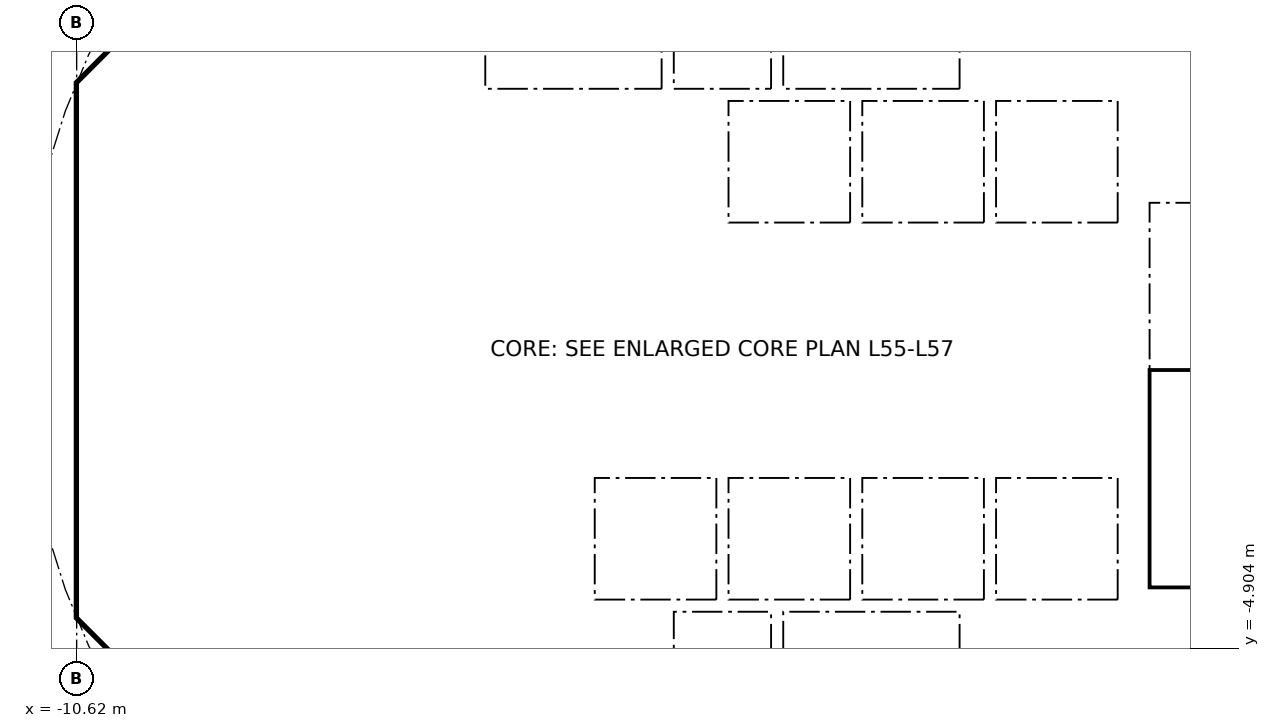
"""IFC4 building model, lengths in metres.
Left out: names, types, materials, properties, quantities, classifications, styles, units other than length and angle.
Written with IfcOpenShell. Run it as: python <this file> out.ifc"""

import sys

from ifc_helpers import new_model, si_unit, direction, frame, frame_2d, origin, place, context, subcontext, project, spatial, polyline, rectangle, outline, extrude, element, fill, save


model = new_model("IFC4")
c1 = context("Model", 3, precision=1e-05, world=origin(), true_north=direction((0.0, 1.0)))
c2 = subcontext(c1, "Body", "Model", "MODEL_VIEW")
j1 = project(units=[si_unit("LENGTHUNIT", "METRE"), si_unit("PLANEANGLEUNIT", "RADIAN")], contexts=[c1])
p1 = place(None, origin())
s1 = spatial("IfcSite", under=j1, at=p1, CompositionType="ELEMENT")
p2 = place(p1, origin())
s2 = spatial("IfcBuilding", under=s1, at=p2, CompositionType="ELEMENT")
p3 = place(p2, frame((0.0, 0.0, 219.6)))
s3 = spatial("IfcBuildingStorey", under=s2, at=p3, CompositionType="ELEMENT", Elevation=219.6)
p4 = place(p3, frame((9.988, 4.613, 0.0), z_axis=(0.0, 0.0, 1.0), x_axis=(-0.707106781187, 0.707106781187, 0.0)))
e1 = element("IfcWall", 1, at=p4, inside=s3, PredefinedType="SHEAR", context=c2, shape_type="SweptSolid", body=[
    extrude(rectangle(XDim=7.602, YDim=0.6, at=frame_2d((3.801, 0.0))), origin(), (0.0, 0.0, 1.0), 3.44),
])
p5 = place(p4, frame((3.201, 0.0, 0.0)))
e2 = element("IfcOpeningElement", 2, at=p5, cuts=e1, PredefinedType="OPENING", context=c2, shape_type="SweptSolid", body=[
    extrude(rectangle(XDim=1.2, YDim=2.1, at=frame_2d((0.6, 1.05))), frame((0.0, 0.31, 0.0), z_axis=(0.0, -1.0, 0.0), x_axis=(1.0, 0.0, 0.0)), (0.0, 0.0, 1.0), 0.62),
])
p6 = place(p3, frame((-4.613, 9.988, 0.0), z_axis=(0.0, 0.0, 1.0), x_axis=(-0.707106781187, -0.707106781187, 0.0)))
e3 = element("IfcWall", 3, at=p6, inside=s3, PredefinedType="SHEAR", context=c2, shape_type="SweptSolid", body=[
    extrude(rectangle(XDim=7.602, YDim=0.6, at=frame_2d((3.801, 0.0))), origin(), (0.0, 0.0, 1.0), 3.44),
])
p7 = place(p6, frame((0.351, 0.0, 0.0)))
e4 = element("IfcOpeningElement", 4, at=p7, cuts=e3, PredefinedType="OPENING", context=c2, shape_type="SweptSolid", body=[
    extrude(rectangle(XDim=1.1, YDim=2.1, at=frame_2d((0.55, 1.05))), frame((0.0, 0.31, 0.0), z_axis=(0.0, -1.0, 0.0), x_axis=(1.0, 0.0, 0.0)), (0.0, 0.0, 1.0), 0.62),
])
p8 = place(p3, frame((-10.325, 3.801, 0.0), z_axis=(0.0, 0.0, 1.0), x_axis=(0.0, -1.0, 0.0)))
e5 = element("IfcWall", 5, at=p8, inside=s3, PredefinedType="SHEAR", context=c2, shape_type="SweptSolid", body=[
    extrude(rectangle(XDim=7.602, YDim=0.6, at=frame_2d((3.801, 0.0))), origin(), (0.0, 0.0, 1.0), 3.44),
])
p9 = place(p8, frame((0.651, 0.0, 0.0)))
e6 = element("IfcOpeningElement", 6, at=p9, cuts=e5, PredefinedType="OPENING", context=c2, shape_type="SweptSolid", body=[
    extrude(rectangle(XDim=1.5, YDim=2.1, at=frame_2d((0.75, 1.05))), frame((0.0, 0.31, 0.0), z_axis=(0.0, -1.0, 0.0), x_axis=(1.0, 0.0, 0.0)), (0.0, 0.0, 1.0), 0.62),
])
p10 = place(p8, frame((5.451, 0.0, 0.0)))
e7 = element("IfcOpeningElement", 7, at=p10, cuts=e5, PredefinedType="OPENING", context=c2, shape_type="SweptSolid", body=[
    extrude(rectangle(XDim=1.5, YDim=2.1, at=frame_2d((0.75, 1.05))), frame((0.0, 0.31, 0.0), z_axis=(0.0, -1.0, 0.0), x_axis=(1.0, 0.0, 0.0)), (0.0, 0.0, 1.0), 0.62),
])
p11 = place(p3, frame((-9.988, -4.613, 0.0), z_axis=(0.0, 0.0, 1.0), x_axis=(0.707106781187, -0.707106781187, 0.0)))
e8 = element("IfcWall", 8, at=p11, inside=s3, PredefinedType="SHEAR", context=c2, shape_type="SweptSolid", body=[
    extrude(rectangle(XDim=7.602, YDim=0.6, at=frame_2d((3.801, 0.0))), origin(), (0.0, 0.0, 1.0), 3.44),
])
p12 = place(p11, frame((6.151, 0.0, 0.0)))
e9 = element("IfcOpeningElement", 9, at=p12, cuts=e8, PredefinedType="OPENING", context=c2, shape_type="SweptSolid", body=[
    extrude(rectangle(XDim=1.1, YDim=2.1, at=frame_2d((0.55, 1.05))), frame((0.0, 0.31, 0.0), z_axis=(0.0, -1.0, 0.0), x_axis=(1.0, 0.0, 0.0)), (0.0, 0.0, 1.0), 0.62),
])
p13 = place(p3, frame((4.613, -9.988, 0.0), z_axis=(0.0, 0.0, 1.0), x_axis=(0.707106781187, 0.707106781187, 0.0)))
e10 = element("IfcWall", 10, at=p13, inside=s3, PredefinedType="SHEAR", context=c2, shape_type="SweptSolid", body=[
    extrude(rectangle(XDim=7.602, YDim=0.6, at=frame_2d((3.801, 0.0))), origin(), (0.0, 0.0, 1.0), 3.44),
])
p14 = place(p13, frame((3.201, 0.0, 0.0)))
e11 = element("IfcOpeningElement", 11, at=p14, cuts=e10, PredefinedType="OPENING", context=c2, shape_type="SweptSolid", body=[
    extrude(rectangle(XDim=1.2, YDim=2.1, at=frame_2d((0.6, 1.05))), frame((0.0, 0.31, 0.0), z_axis=(0.0, -1.0, 0.0), x_axis=(1.0, 0.0, 0.0)), (0.0, 0.0, 1.0), 0.62),
])
p15 = place(p3, frame((-6.2, 4.3, 0.0), z_axis=(0.0, 0.0, 1.0), x_axis=(0.0, 1.0, 0.0)))
e12 = element("IfcWall", 12, at=p15, inside=s3, PredefinedType="PARTITIONING", context=c2, shape_type="SweptSolid", body=[
    extrude(rectangle(XDim=3.527, YDim=0.15, at=frame_2d((1.763, 0.0))), origin(), (0.0, 0.0, 1.0), 3.44),
])
p16 = place(p15, frame((0.262, 0.0, 0.0)))
e13 = element("IfcOpeningElement", 13, at=p16, cuts=e12, PredefinedType="OPENING", context=c2, shape_type="SweptSolid", body=[
    extrude(rectangle(XDim=0.9, YDim=2.1, at=frame_2d((0.45, 1.05))), frame((0.0, 0.085, 0.0), z_axis=(0.0, -1.0, 0.0), x_axis=(1.0, 0.0, 0.0)), (0.0, 0.0, 1.0), 0.17),
])
p17 = place(p15, frame((2.138, 0.0, 0.0)))
e14 = element("IfcOpeningElement", 14, at=p17, cuts=e12, PredefinedType="OPENING", context=c2, shape_type="SweptSolid", body=[
    extrude(rectangle(XDim=0.9, YDim=2.1, at=frame_2d((0.45, 1.05))), frame((0.0, 0.085, 0.0), z_axis=(0.0, -1.0, 0.0), x_axis=(1.0, 0.0, 0.0)), (0.0, 0.0, 1.0), 0.17),
])
p18 = place(p3, frame((4.0, 4.3, 0.0), z_axis=(0.0, 0.0, 1.0), x_axis=(0.0, 1.0, 0.0)))
e15 = element("IfcWall", 15, at=p18, inside=s3, PredefinedType="SOLIDWALL", context=c2, shape_type="SweptSolid", body=[
    extrude(rectangle(XDim=2.2, YDim=0.2, at=frame_2d((1.1, 0.0))), origin(), (0.0, 0.0, 1.0), 3.44),
])
p19 = place(p18, frame((0.55, 0.0, 0.0)))
e16 = element("IfcOpeningElement", 16, at=p19, cuts=e15, PredefinedType="OPENING", context=c2, shape_type="SweptSolid", body=[
    extrude(rectangle(XDim=1.1, YDim=2.1, at=frame_2d((0.55, 1.05))), frame((0.0, 0.11, 0.0), z_axis=(0.0, -1.0, 0.0), x_axis=(1.0, 0.0, 0.0)), (0.0, 0.0, 1.0), 0.22),
])
p20 = place(p3, frame((-4.0, 4.3, 0.0), z_axis=(0.0, 0.0, 1.0), x_axis=(0.0, 1.0, 0.0)))
e17 = element("IfcWall", 17, at=p20, inside=s3, PredefinedType="SOLIDWALL", context=c2, shape_type="SweptSolid", body=[
    extrude(rectangle(XDim=2.2, YDim=0.2, at=frame_2d((1.1, 0.0))), origin(), (0.0, 0.0, 1.0), 3.44),
])
p21 = place(p20, frame((0.55, 0.0, 0.0)))
e18 = element("IfcOpeningElement", 18, at=p21, cuts=e17, PredefinedType="OPENING", context=c2, shape_type="SweptSolid", body=[
    extrude(rectangle(XDim=1.1, YDim=2.1, at=frame_2d((0.55, 1.05))), frame((0.0, 0.11, 0.0), z_axis=(0.0, -1.0, 0.0), x_axis=(1.0, 0.0, 0.0)), (0.0, 0.0, 1.0), 0.22),
])
p22 = place(p3, frame((-6.7, 2.0, 0.0), z_axis=(0.0, 0.0, 1.0), x_axis=(1.0, 0.0, 0.0)))
e19 = element("IfcWall", 19, at=p22, inside=s3, PredefinedType="SOLIDWALL", context=c2, shape_type="SweptSolid", body=[
    extrude(rectangle(XDim=13.4, YDim=0.2, at=frame_2d((6.7, 0.0))), origin(), (0.0, 0.0, 1.0), 3.44),
])
p23 = place(p22, frame((7.25, 0.0, 0.0)))
e20 = element("IfcOpeningElement", 20, at=p23, cuts=e19, PredefinedType="OPENING", context=c2, shape_type="SweptSolid", body=[
    extrude(rectangle(XDim=1.1, YDim=2.1, at=frame_2d((0.55, 1.05))), frame((0.0, 0.11, 0.0), z_axis=(0.0, -1.0, 0.0), x_axis=(1.0, 0.0, 0.0)), (0.0, 0.0, 1.0), 0.22),
])
p24 = place(p22, frame((9.45, 0.0, 0.0)))
e21 = element("IfcOpeningElement", 21, at=p24, cuts=e19, PredefinedType="OPENING", context=c2, shape_type="SweptSolid", body=[
    extrude(rectangle(XDim=1.1, YDim=2.1, at=frame_2d((0.55, 1.05))), frame((0.0, 0.11, 0.0), z_axis=(0.0, -1.0, 0.0), x_axis=(1.0, 0.0, 0.0)), (0.0, 0.0, 1.0), 0.22),
])
p25 = place(p22, frame((1.85, 0.0, 0.0)))
e22 = element("IfcOpeningElement", 22, at=p25, cuts=e19, PredefinedType="OPENING", context=c2, shape_type="SweptSolid", body=[
    extrude(rectangle(XDim=0.9, YDim=2.1, at=frame_2d((0.45, 1.05))), frame((0.0, 0.11, 0.0), z_axis=(0.0, -1.0, 0.0), x_axis=(1.0, 0.0, 0.0)), (0.0, 0.0, 1.0), 0.22),
])
p26 = place(p22, frame((5.15, 0.0, 0.0)))
e23 = element("IfcOpeningElement", 23, at=p26, cuts=e19, PredefinedType="OPENING", context=c2, shape_type="SweptSolid", body=[
    extrude(rectangle(XDim=0.9, YDim=2.1, at=frame_2d((0.45, 1.05))), frame((0.0, 0.11, 0.0), z_axis=(0.0, -1.0, 0.0), x_axis=(1.0, 0.0, 0.0)), (0.0, 0.0, 1.0), 0.22),
])
p27 = place(p3, frame((6.7, 4.0, 0.0), z_axis=(0.0, 0.0, 1.0), x_axis=(1.0, 0.0, 0.0)))
e24 = element("IfcWall", 24, at=p27, inside=s3, PredefinedType="SOLIDWALL", context=c2, shape_type="SweptSolid", body=[
    extrude(rectangle(XDim=3.325, YDim=0.2, at=frame_2d((1.662, 0.0))), origin(), (0.0, 0.0, 1.0), 3.44),
])
p28 = place(p27, frame((1.25, 0.0, 0.0)))
e25 = element("IfcOpeningElement", 25, at=p28, cuts=e24, PredefinedType="OPENING", context=c2, shape_type="SweptSolid", body=[
    extrude(rectangle(XDim=1.1, YDim=2.1, at=frame_2d((0.55, 1.05))), frame((0.0, 0.11, 0.0), z_axis=(0.0, -1.0, 0.0), x_axis=(1.0, 0.0, 0.0)), (0.0, 0.0, 1.0), 0.22),
])
p29 = place(p3, frame((-6.6, -7.427, 0.0), z_axis=(0.0, 0.0, 1.0), x_axis=(0.0, 1.0, 0.0)))
e26 = element("IfcWall", 26, at=p29, inside=s3, PredefinedType="PARTITIONING", context=c2, shape_type="SweptSolid", body=[
    extrude(rectangle(XDim=3.127, YDim=0.15, at=frame_2d((1.563, 0.0))), origin(), (0.0, 0.0, 1.0), 3.44),
])
p30 = place(p29, frame((1.076, 0.0, 0.0)))
e27 = element("IfcOpeningElement", 27, at=p30, cuts=e26, PredefinedType="OPENING", context=c2, shape_type="SweptSolid", body=[
    extrude(rectangle(XDim=0.9, YDim=2.1, at=frame_2d((0.45, 1.05))), frame((0.0, 0.085, 0.0), z_axis=(0.0, -1.0, 0.0), x_axis=(1.0, 0.0, 0.0)), (0.0, 0.0, 1.0), 0.17),
])
p31 = place(p3, frame((4.0, -6.5, 0.0), z_axis=(0.0, 0.0, 1.0), x_axis=(0.0, 1.0, 0.0)))
e28 = element("IfcWall", 28, at=p31, inside=s3, PredefinedType="SOLIDWALL", context=c2, shape_type="SweptSolid", body=[
    extrude(rectangle(XDim=2.2, YDim=0.2, at=frame_2d((1.1, 0.0))), origin(), (0.0, 0.0, 1.0), 3.44),
])
p32 = place(p31, frame((0.55, 0.0, 0.0)))
e29 = element("IfcOpeningElement", 29, at=p32, cuts=e28, PredefinedType="OPENING", context=c2, shape_type="SweptSolid", body=[
    extrude(rectangle(XDim=1.1, YDim=2.1, at=frame_2d((0.55, 1.05))), frame((0.0, 0.11, 0.0), z_axis=(0.0, -1.0, 0.0), x_axis=(1.0, 0.0, 0.0)), (0.0, 0.0, 1.0), 0.22),
])
p33 = place(p3, frame((-4.0, -6.5, 0.0), z_axis=(0.0, 0.0, 1.0), x_axis=(0.0, 1.0, 0.0)))
e30 = element("IfcWall", 30, at=p33, inside=s3, PredefinedType="SOLIDWALL", context=c2, shape_type="SweptSolid", body=[
    extrude(rectangle(XDim=2.2, YDim=0.2, at=frame_2d((1.1, 0.0))), origin(), (0.0, 0.0, 1.0), 3.44),
])
p34 = place(p33, frame((0.65, 0.0, 0.0)))
e31 = element("IfcOpeningElement", 31, at=p34, cuts=e30, PredefinedType="OPENING", context=c2, shape_type="SweptSolid", body=[
    extrude(rectangle(XDim=0.9, YDim=2.1, at=frame_2d((0.45, 1.05))), frame((0.0, 0.11, 0.0), z_axis=(0.0, -1.0, 0.0), x_axis=(1.0, 0.0, 0.0)), (0.0, 0.0, 1.0), 0.22),
])
p35 = place(p3, frame((-6.7, -2.0, 0.0), z_axis=(0.0, 0.0, 1.0), x_axis=(1.0, 0.0, 0.0)))
e32 = element("IfcWall", 32, at=p35, inside=s3, PredefinedType="SOLIDWALL", context=c2, shape_type="SweptSolid", body=[
    extrude(rectangle(XDim=13.4, YDim=0.2, at=frame_2d((6.7, 0.0))), origin(), (0.0, 0.0, 1.0), 3.44),
])
p36 = place(p35, frame((5.05, 0.0, 0.0)))
e33 = element("IfcOpeningElement", 33, at=p36, cuts=e32, PredefinedType="OPENING", context=c2, shape_type="SweptSolid", body=[
    extrude(rectangle(XDim=1.1, YDim=2.1, at=frame_2d((0.55, 1.05))), frame((0.0, 0.11, 0.0), z_axis=(0.0, -1.0, 0.0), x_axis=(1.0, 0.0, 0.0)), (0.0, 0.0, 1.0), 0.22),
])
p37 = place(p35, frame((7.25, 0.0, 0.0)))
e34 = element("IfcOpeningElement", 34, at=p37, cuts=e32, PredefinedType="OPENING", context=c2, shape_type="SweptSolid", body=[
    extrude(rectangle(XDim=1.1, YDim=2.1, at=frame_2d((0.55, 1.05))), frame((0.0, 0.11, 0.0), z_axis=(0.0, -1.0, 0.0), x_axis=(1.0, 0.0, 0.0)), (0.0, 0.0, 1.0), 0.22),
])
p38 = place(p35, frame((1.85, 0.0, 0.0)))
e35 = element("IfcOpeningElement", 35, at=p38, cuts=e32, PredefinedType="OPENING", context=c2, shape_type="SweptSolid", body=[
    extrude(rectangle(XDim=0.9, YDim=2.1, at=frame_2d((0.45, 1.05))), frame((0.0, 0.11, 0.0), z_axis=(0.0, -1.0, 0.0), x_axis=(1.0, 0.0, 0.0)), (0.0, 0.0, 1.0), 0.22),
])
p39 = place(p3, origin())
e36 = element("IfcWall", 36, at=p39, inside=s3, PredefinedType="SHEAR", context=c2, shape_type="SweptSolid", body=[
    extrude(outline(polyline([(-10.625, -3.801), (-10.025, -3.801), (-10.025, -4.152), (-9.776, -4.401), (-10.2, -4.825), (-10.625, -4.401), (-10.625, -3.801)])), origin(), (0.0, 0.0, 1.0), 3.44),
])
p40 = place(p3, origin())
e37 = element("IfcWall", 37, at=p40, inside=s3, PredefinedType="SHEAR", context=c2, shape_type="SweptSolid", body=[
    extrude(outline(polyline([(-10.2, 4.825), (-9.776, 4.401), (-10.025, 4.152), (-10.025, 3.801), (-10.625, 3.801), (-10.625, 4.401), (-10.2, 4.825)])), origin(), (0.0, 0.0, 1.0), 3.44),
])
for number, where, z_axis, x_axis in (
    (38, (-10.025, -4.0, 0.0), (0.0, 0.0, 1.0), (1.0, 0.0, 0.0)),
    (39, (-10.025, 4.0, 0.0), (0.0, 0.0, 1.0), (1.0, 0.0, 0.0)),
):
    element("IfcWall", number, at=place(p3, frame(where, z_axis=z_axis, x_axis=x_axis)), inside=s3, PredefinedType="PARTITIONING", context=c2, shape_type="SweptSolid", body=[
        extrude(rectangle(XDim=3.325, YDim=0.2, at=frame_2d((1.662, 0.0))), origin(), (0.0, 0.0, 1.0), 3.44),
    ])
for number, where, z_axis, x_axis in (
    (40, (-0.9, -6.5, 0.0), (0.0, 0.0, 1.0), (0.0, 1.0, 0.0)),
    (41, (0.9, -6.5, 0.0), (0.0, 0.0, 1.0), (0.0, 1.0, 0.0)),
):
    element("IfcWall", number, at=place(p3, frame(where, z_axis=z_axis, x_axis=x_axis)), inside=s3, PredefinedType="SOLIDWALL", context=c2, shape_type="SweptSolid", body=[
        extrude(rectangle(XDim=2.2, YDim=0.2, at=frame_2d((1.1, 0.0))), origin(), (0.0, 0.0, 1.0), 3.44),
    ])
p41 = place(p3, origin())
e42 = element("IfcWall", 42, at=p41, inside=s3, PredefinedType="SOLIDWALL", context=c2, shape_type="SweptSolid", body=[
    extrude(outline(polyline([(-6.7, -2.1), (-6.5, -2.1), (-6.5, -4.1), (-2.3, -4.1), (-2.3, -2.1), (-2.1, -2.1), (-2.1, -4.1), (-0.1, -4.1), (-0.1, -2.1), (0.1, -2.1), (0.1, -4.1), (2.1, -4.1), (2.1, -2.1), (2.3, -2.1), (2.3, -4.1), (4.3, -4.1), (4.3, -2.1), (4.5, -2.1), (4.5, -4.1), (6.5, -4.1), (6.5, -2.1), (6.7, -2.1), (6.7, -4.3), (-6.7, -4.3), (-6.7, -2.1)])), origin(), (0.0, 0.0, 1.0), 3.44),
])
for number, where, z_axis, x_axis in (
    (43, (-0.9, 4.3, 0.0), (0.0, 0.0, 1.0), (0.0, 1.0, 0.0)),
    (44, (0.9, 4.3, 0.0), (0.0, 0.0, 1.0), (0.0, 1.0, 0.0)),
):
    element("IfcWall", number, at=place(p3, frame(where, z_axis=z_axis, x_axis=x_axis)), inside=s3, PredefinedType="SOLIDWALL", context=c2, shape_type="SweptSolid", body=[
        extrude(rectangle(XDim=2.2, YDim=0.2, at=frame_2d((1.1, 0.0))), origin(), (0.0, 0.0, 1.0), 3.44),
    ])
p42 = place(p3, origin())
e45 = element("IfcWall", 45, at=p42, inside=s3, PredefinedType="SOLIDWALL", context=c2, shape_type="SweptSolid", body=[
    extrude(outline(polyline([(-6.7, 4.3), (6.7, 4.3), (6.7, 2.1), (6.5, 2.1), (6.5, 4.1), (4.5, 4.1), (4.5, 2.1), (4.3, 2.1), (4.3, 4.1), (2.3, 4.1), (2.3, 2.1), (2.1, 2.1), (2.1, 4.1), (0.1, 4.1), (0.1, 2.1), (-0.1, 2.1), (-0.1, 4.1), (-2.1, 4.1), (-2.1, 2.1), (-2.3, 2.1), (-2.3, 4.1), (-6.5, 4.1), (-6.5, 2.1), (-6.7, 2.1), (-6.7, 4.3)])), origin(), (0.0, 0.0, 1.0), 3.44),
])
p43 = place(p3, origin())
e46 = element("IfcWall", 46, at=p43, inside=s3, PredefinedType="SOLIDWALL", context=c2, shape_type="SweptSolid", body=[
    extrude(outline(polyline([(7.025, -3.9), (6.7, -3.9), (6.7, 3.9), (7.025, 3.9), (7.025, -3.9)])), origin(), (0.0, 0.0, 1.0), 3.44),
])
p44 = place(p3, origin())
e47 = element("IfcWall", 47, at=p44, inside=s3, PredefinedType="SOLIDWALL", context=c2, shape_type="SweptSolid", body=[
    extrude(outline(polyline([(10.025, -4.1), (6.7, -4.1), (6.7, -3.9), (10.025, -3.9), (10.025, -4.1)])), origin(), (0.0, 0.0, 1.0), 3.44),
])
p45 = place(p23, origin())
e48 = element("IfcDoor", 48, at=p45, inside=s3, OperationType="DOUBLE_DOOR_SLIDING", PredefinedType="DOOR", context=c2, shape_type="SweptSolid", body=[
    extrude(rectangle(XDim=1.1, YDim=2.1, at=frame_2d((0.55, 1.05))), frame((0.0, 0.025, 0.0), z_axis=(0.0, -1.0, 0.0), x_axis=(1.0, 0.0, 0.0)), (0.0, 0.0, 1.0), 0.05),
])
fill(e20, e48)
p46 = place(p24, origin())
e49 = element("IfcDoor", 49, at=p46, inside=s3, OperationType="DOUBLE_DOOR_SLIDING", PredefinedType="DOOR", context=c2, shape_type="SweptSolid", body=[
    extrude(rectangle(XDim=1.1, YDim=2.1, at=frame_2d((0.55, 1.05))), frame((0.0, 0.025, 0.0), z_axis=(0.0, -1.0, 0.0), x_axis=(1.0, 0.0, 0.0)), (0.0, 0.0, 1.0), 0.05),
])
fill(e21, e49)
p47 = place(p36, origin())
e50 = element("IfcDoor", 50, at=p47, inside=s3, OperationType="DOUBLE_DOOR_SLIDING", PredefinedType="DOOR", context=c2, shape_type="SweptSolid", body=[
    extrude(rectangle(XDim=1.1, YDim=2.1, at=frame_2d((0.55, 1.05))), frame((0.0, 0.025, 0.0), z_axis=(0.0, -1.0, 0.0), x_axis=(1.0, 0.0, 0.0)), (0.0, 0.0, 1.0), 0.05),
])
fill(e33, e50)
p48 = place(p37, origin())
e51 = element("IfcDoor", 51, at=p48, inside=s3, OperationType="DOUBLE_DOOR_SLIDING", PredefinedType="DOOR", context=c2, shape_type="SweptSolid", body=[
    extrude(rectangle(XDim=1.1, YDim=2.1, at=frame_2d((0.55, 1.05))), frame((0.0, 0.025, 0.0), z_axis=(0.0, -1.0, 0.0), x_axis=(1.0, 0.0, 0.0)), (0.0, 0.0, 1.0), 0.05),
])
fill(e34, e51)
p49 = place(p19, origin())
e52 = element("IfcDoor", 52, at=p49, inside=s3, OperationType="DOUBLE_DOOR_SLIDING", PredefinedType="DOOR", context=c2, shape_type="SweptSolid", body=[
    extrude(rectangle(XDim=1.1, YDim=2.1, at=frame_2d((0.55, 1.05))), frame((0.0, 0.025, 0.0), z_axis=(0.0, -1.0, 0.0), x_axis=(1.0, 0.0, 0.0)), (0.0, 0.0, 1.0), 0.05),
])
fill(e16, e52)
p50 = place(p32, origin())
e53 = element("IfcDoor", 53, at=p50, inside=s3, OperationType="DOUBLE_DOOR_SLIDING", PredefinedType="DOOR", context=c2, shape_type="SweptSolid", body=[
    extrude(rectangle(XDim=1.1, YDim=2.1, at=frame_2d((0.55, 1.05))), frame((0.0, 0.025, 0.0), z_axis=(0.0, -1.0, 0.0), x_axis=(1.0, 0.0, 0.0)), (0.0, 0.0, 1.0), 0.05),
])
fill(e29, e53)
p51 = place(p21, origin())
e54 = element("IfcDoor", 54, at=p51, inside=s3, OperationType="DOUBLE_DOOR_SLIDING", PredefinedType="DOOR", context=c2, shape_type="SweptSolid", body=[
    extrude(rectangle(XDim=1.1, YDim=2.1, at=frame_2d((0.55, 1.05))), frame((0.0, 0.025, 0.0), z_axis=(0.0, -1.0, 0.0), x_axis=(1.0, 0.0, 0.0)), (0.0, 0.0, 1.0), 0.05),
])
fill(e18, e54)
p52 = place(p16, origin())
e55 = element("IfcDoor", 55, at=p52, inside=s3, OperationType="SINGLE_SWING_RIGHT", PredefinedType="DOOR", context=c2, shape_type="SweptSolid", body=[
    extrude(rectangle(XDim=0.9, YDim=2.1, at=frame_2d((0.45, 1.05))), frame((0.0, 0.025, 0.0), z_axis=(0.0, -1.0, 0.0), x_axis=(1.0, 0.0, 0.0)), (0.0, 0.0, 1.0), 0.05),
])
fill(e13, e55)
p53 = place(p25, origin())
e56 = element("IfcDoor", 56, at=p53, inside=s3, OperationType="SINGLE_SWING_LEFT", PredefinedType="DOOR", context=c2, shape_type="SweptSolid", body=[
    extrude(rectangle(XDim=0.9, YDim=2.1, at=frame_2d((0.45, 1.05))), frame((0.0, 0.025, 0.0), z_axis=(0.0, -1.0, 0.0), x_axis=(1.0, 0.0, 0.0)), (0.0, 0.0, 1.0), 0.05),
])
fill(e22, e56)
p54 = place(p26, origin())
e57 = element("IfcDoor", 57, at=p54, inside=s3, OperationType="SINGLE_SWING_LEFT", PredefinedType="DOOR", context=c2, shape_type="SweptSolid", body=[
    extrude(rectangle(XDim=0.9, YDim=2.1, at=frame_2d((0.45, 1.05))), frame((0.0, 0.025, 0.0), z_axis=(0.0, -1.0, 0.0), x_axis=(1.0, 0.0, 0.0)), (0.0, 0.0, 1.0), 0.05),
])
fill(e23, e57)
p55 = place(p38, frame((0.9, 0.0, 0.0), x_axis=(-1.0, 0.0, 0.0)))
e58 = element("IfcDoor", 58, at=p55, inside=s3, OperationType="SINGLE_SWING_RIGHT", PredefinedType="DOOR", context=c2, shape_type="SweptSolid", body=[
    extrude(rectangle(XDim=0.9, YDim=2.1, at=frame_2d((0.45, 1.05))), frame((0.0, 0.025, 0.0), z_axis=(0.0, -1.0, 0.0), x_axis=(1.0, 0.0, 0.0)), (0.0, 0.0, 1.0), 0.05),
])
fill(e35, e58)
p56 = place(p9, origin())
e59 = element("IfcDoor", 59, at=p56, inside=s3, OperationType="DOUBLE_DOOR_SINGLE_SWING", PredefinedType="DOOR", context=c2, shape_type="SweptSolid", body=[
    extrude(rectangle(XDim=1.5, YDim=2.1, at=frame_2d((0.75, 1.05))), frame((0.0, 0.025, 0.0), z_axis=(0.0, -1.0, 0.0), x_axis=(1.0, 0.0, 0.0)), (0.0, 0.0, 1.0), 0.05),
])
fill(e6, e59)
p57 = place(p10, origin())
e60 = element("IfcDoor", 60, at=p57, inside=s3, OperationType="DOUBLE_DOOR_SINGLE_SWING", PredefinedType="DOOR", context=c2, shape_type="SweptSolid", body=[
    extrude(rectangle(XDim=1.5, YDim=2.1, at=frame_2d((0.75, 1.05))), frame((0.0, 0.025, 0.0), z_axis=(0.0, -1.0, 0.0), x_axis=(1.0, 0.0, 0.0)), (0.0, 0.0, 1.0), 0.05),
])
fill(e7, e60)
save(model, sys.argv[1])
